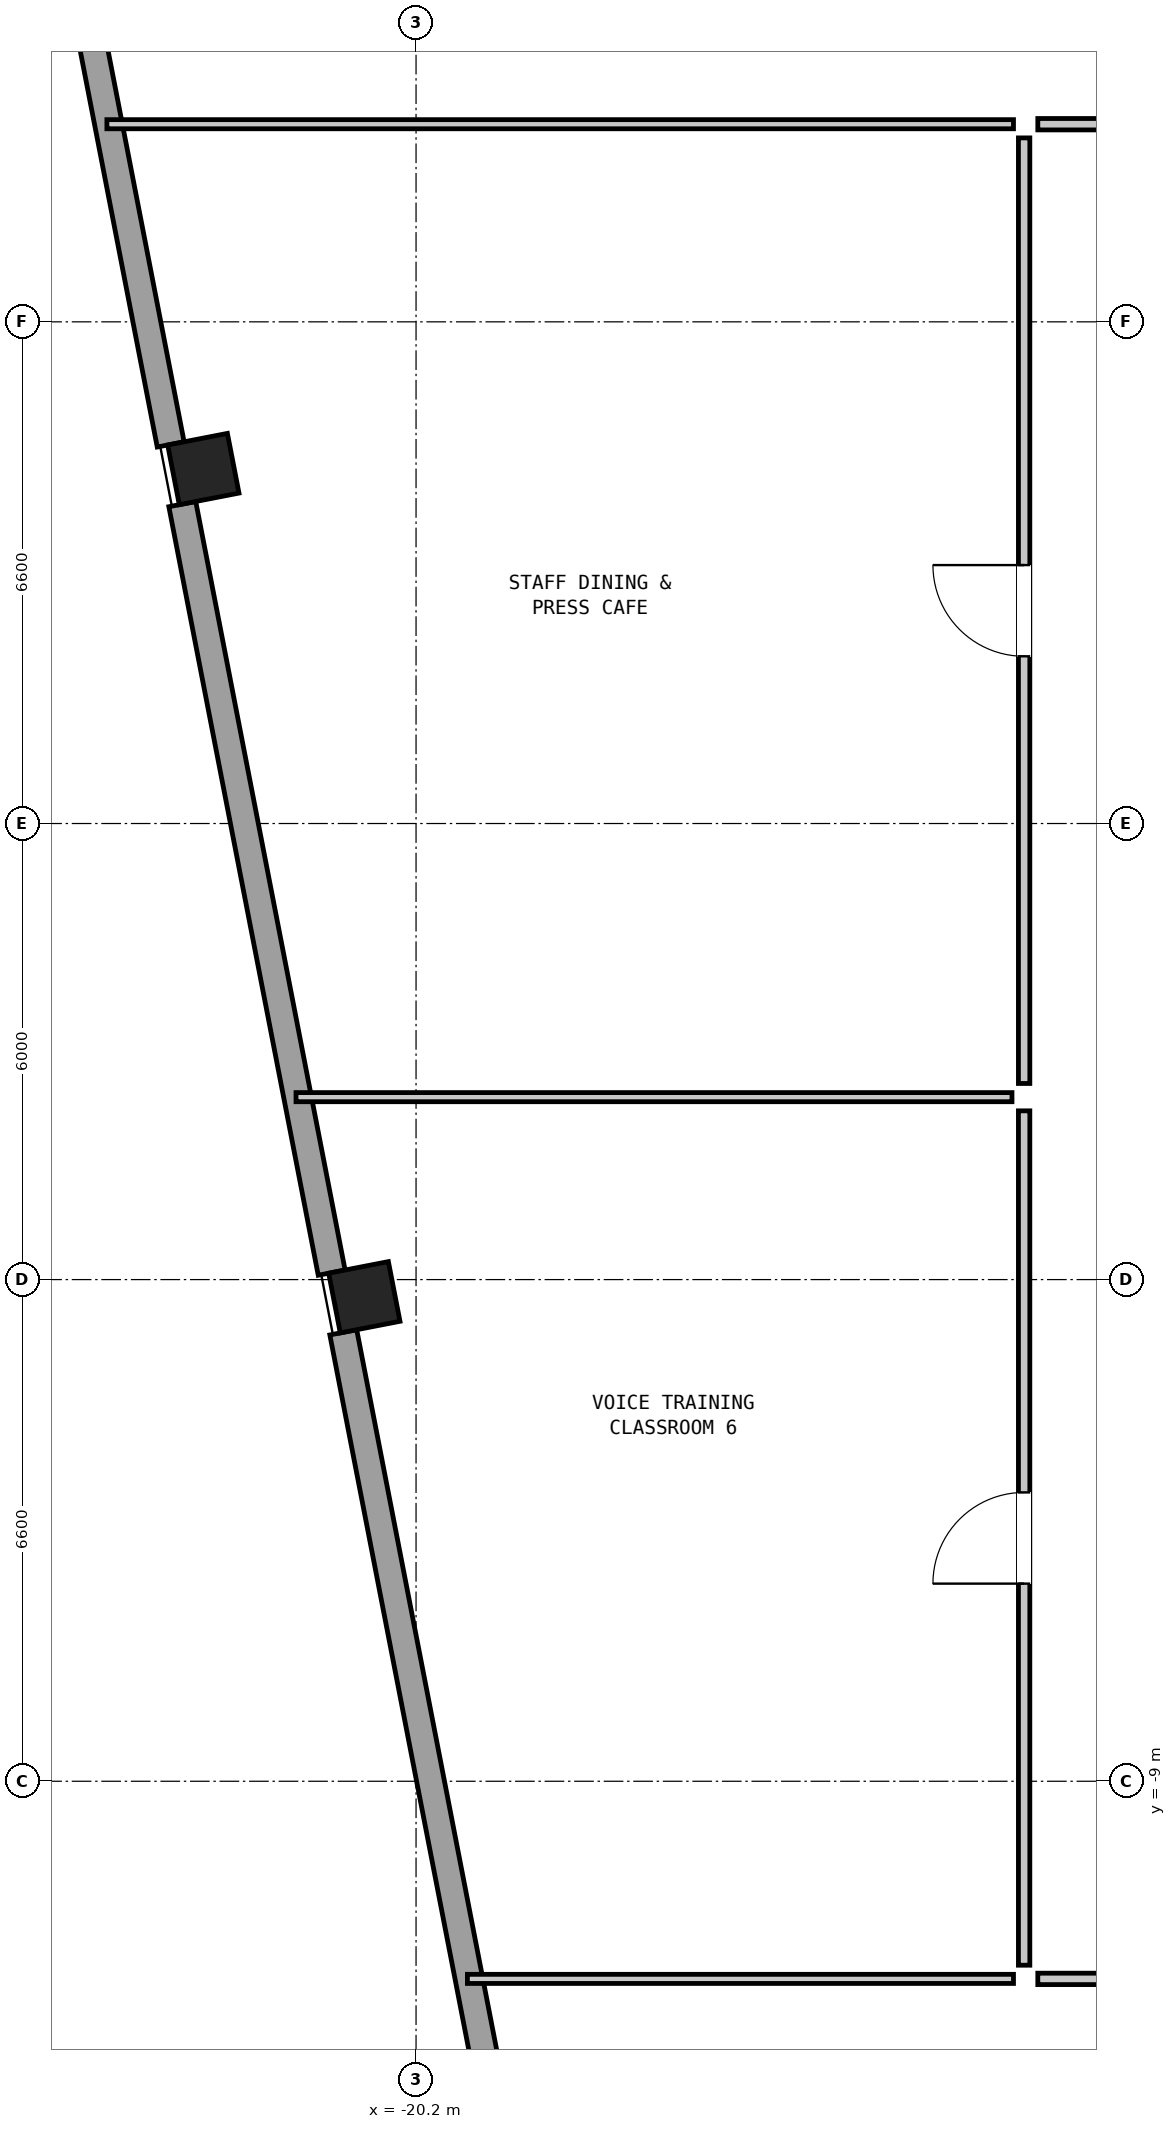
"""IFC4 building model, lengths in metres.
Left out: names, types, materials, properties, quantities, classifications, styles, units other than length and angle.
Written with IfcOpenShell. Run it as: python <this file> out.ifc"""

import sys

from ifc_helpers import new_model, si_unit, direction, frame, frame_2d, origin, origin_2d, place, context, subcontext, project, spatial, rectangle, hollow_rectangle, extrude, element, fill, save


model = new_model("IFC4")
c1 = context("Model", 3, precision=1e-05, world=origin(), true_north=direction((0.0, 1.0)))
c2 = subcontext(c1, "Body", "Model", "MODEL_VIEW")
j1 = project(units=[si_unit("LENGTHUNIT", "METRE"), si_unit("PLANEANGLEUNIT", "RADIAN")], contexts=[c1])
p1 = place(None, origin())
s1 = spatial("IfcSite", under=j1, at=p1, CompositionType="ELEMENT")
p2 = place(p1, origin())
s2 = spatial("IfcBuilding", under=s1, at=p2, CompositionType="ELEMENT")
p3 = place(p2, frame((0.0, 0.0, 137.2)))
s3 = spatial("IfcBuildingStorey", under=s2, at=p3, CompositionType="ELEMENT", Elevation=137.2)
for number, where, z_axis, x_axis in (
    (1, (-22.998, 8.263, 0.0), (0.0, 0.0, 1.0), (-0.191, 0.982, 0.0)),
    (2, (-20.88, -2.633, 0.0), (0.0, 0.0, 1.0), (-0.191, 0.982, 0.0)),
):
    element("IfcColumn", number, at=place(p3, frame(where, z_axis=z_axis, x_axis=x_axis)), inside=s3, PredefinedType="COLUMN", context=c2, shape_type="SweptSolid", body=[
        extrude(hollow_rectangle(XDim=0.8, YDim=0.8, WallThickness=0.05, at=origin_2d()), origin(), (0.0, 0.0, 1.0), 3.05),
    ])
p4 = place(p3, frame((-19.19, -13.217, 0.0), z_axis=(0.0, 0.0, 1.0), x_axis=(-0.190822765986, 0.981624506612, 0.0)))
e3 = element("IfcWall", 3, at=p4, inside=s3, PredefinedType="SOLIDWALL", context=c2, shape_type="SweptSolid", body=[
    extrude(rectangle(XDim=10.312, YDim=0.36, at=frame_2d((5.156, 0.0))), origin(), (0.0, 0.0, 1.0), 0.95),
])
p5 = place(p3, frame((-21.31, -2.309, 0.0), z_axis=(0.0, 0.0, 1.0), x_axis=(-0.190811924826, 0.981626614016, 0.0)))
e4 = element("IfcWall", 4, at=p5, inside=s3, PredefinedType="SOLIDWALL", context=c2, shape_type="SweptSolid", body=[
    extrude(rectangle(XDim=10.3, YDim=0.36, at=frame_2d((5.15, 0.0))), origin(), (0.0, 0.0, 1.0), 0.95),
])
p6 = place(p3, frame((-23.428, 8.587, 0.0), z_axis=(0.0, 0.0, 1.0), x_axis=(-0.190822765986, 0.981624506612, 0.0)))
e5 = element("IfcWall", 5, at=p6, inside=s3, PredefinedType="SOLIDWALL", context=c2, shape_type="SweptSolid", body=[
    extrude(rectangle(XDim=10.312, YDim=0.36, at=frame_2d((5.156, 0.0))), origin(), (0.0, 0.0, 1.0), 0.95),
])
p7 = place(p3, frame((-24.267, 12.8, 0.0), z_axis=(0.0, 0.0, 1.0), x_axis=(1.0, 0.0, 0.0)))
e6 = element("IfcWall", 6, at=p7, inside=s3, PredefinedType="PARTITIONING", context=c2, shape_type="SweptSolid", body=[
    extrude(rectangle(XDim=11.927, YDim=0.12, at=frame_2d((5.964, 0.0))), origin(), (0.0, 0.0, 1.0), 2.83),
])
p8 = place(p3, frame((-19.524, -11.6, 0.0), z_axis=(0.0, 0.0, 1.0), x_axis=(1.0, 0.0, 0.0)))
e7 = element("IfcWall", 7, at=p8, inside=s3, PredefinedType="PARTITIONING", context=c2, shape_type="SweptSolid", body=[
    extrude(rectangle(XDim=7.184, YDim=0.12, at=frame_2d((3.592, 0.0))), origin(), (0.0, 0.0, 1.0), 2.347),
])
p9 = place(p3, frame((-21.779, 0.0, 0.0), z_axis=(0.0, 0.0, 1.0), x_axis=(1.0, 0.0, 0.0)))
e8 = element("IfcWall", 8, at=p9, inside=s3, PredefinedType="PARTITIONING", context=c2, shape_type="SweptSolid", body=[
    extrude(rectangle(XDim=9.419, YDim=0.12, at=frame_2d((4.709, 0.0))), origin(), (0.0, 0.0, 1.0), 2.83),
])
p10 = place(p3, frame((-12.02, 12.8, 0.0), z_axis=(0.0, 0.0, 1.0), x_axis=(1.0, 0.0, 0.0)))
e9 = element("IfcWall", 9, at=p10, inside=s3, PredefinedType="PARTITIONING", context=c2, shape_type="SweptSolid", body=[
    extrude(rectangle(XDim=6.44, YDim=0.15, at=frame_2d((3.22, 0.0))), origin(), (0.0, 0.0, 1.0), 2.83),
])
p11 = place(p10, frame((3.02, 0.0, 0.0)))
e10 = element("IfcOpeningElement", 10, at=p11, cuts=e9, PredefinedType="OPENING", context=c2, shape_type="SweptSolid", body=[
    extrude(rectangle(XDim=1.2, YDim=2.1, at=frame_2d((0.6, 1.05))), frame((0.0, 0.087, 0.0), z_axis=(0.0, -1.0, 0.0), x_axis=(1.0, 0.0, 0.0)), (0.0, 0.0, 1.0), 0.174),
])
p12 = place(p3, frame((-12.02, -11.6, 0.0), z_axis=(0.0, 0.0, 1.0), x_axis=(1.0, 0.0, 0.0)))
e11 = element("IfcWall", 11, at=p12, inside=s3, PredefinedType="PARTITIONING", context=c2, shape_type="SweptSolid", body=[
    extrude(rectangle(XDim=11.84, YDim=0.15, at=frame_2d((5.92, 0.0))), origin(), (0.0, 0.0, 1.0), 2.347),
])
p13 = place(p12, frame((5.32, 0.0, 0.0)))
e12 = element("IfcOpeningElement", 12, at=p13, cuts=e11, PredefinedType="OPENING", context=c2, shape_type="SweptSolid", body=[
    extrude(rectangle(XDim=1.2, YDim=2.1, at=frame_2d((0.6, 1.05))), frame((0.0, 0.087, 0.0), z_axis=(0.0, -1.0, 0.0), x_axis=(1.0, 0.0, 0.0)), (0.0, 0.0, 1.0), 0.174),
])
p14 = place(p3, frame((-12.2, -11.42, 0.0), z_axis=(0.0, 0.0, 1.0), x_axis=(0.0, 1.0, 0.0)))
e13 = element("IfcWall", 13, at=p14, inside=s3, PredefinedType="PARTITIONING", context=c2, shape_type="SweptSolid", body=[
    extrude(rectangle(XDim=11.24, YDim=0.15, at=frame_2d((5.62, 0.0))), origin(), (0.0, 0.0, 1.0), 2.83),
])
p15 = place(p14, frame((5.02, 0.0, 0.0)))
e14 = element("IfcOpeningElement", 14, at=p15, cuts=e13, PredefinedType="OPENING", context=c2, shape_type="SweptSolid", body=[
    extrude(rectangle(XDim=1.2, YDim=2.1, at=frame_2d((0.6, 1.05))), frame((0.0, 0.087, 0.0), z_axis=(0.0, -1.0, 0.0), x_axis=(1.0, 0.0, 0.0)), (0.0, 0.0, 1.0), 0.174),
])
p16 = place(p3, frame((-12.2, 0.18, 0.0), z_axis=(0.0, 0.0, 1.0), x_axis=(0.0, 1.0, 0.0)))
e15 = element("IfcWall", 15, at=p16, inside=s3, PredefinedType="PARTITIONING", context=c2, shape_type="SweptSolid", body=[
    extrude(rectangle(XDim=12.44, YDim=0.15, at=frame_2d((6.22, 0.0))), origin(), (0.0, 0.0, 1.0), 2.83),
])
p17 = place(p16, frame((5.62, 0.0, 0.0)))
e16 = element("IfcOpeningElement", 16, at=p17, cuts=e15, PredefinedType="OPENING", context=c2, shape_type="SweptSolid", body=[
    extrude(rectangle(XDim=1.2, YDim=2.1, at=frame_2d((0.6, 1.05))), frame((0.0, 0.087, 0.0), z_axis=(0.0, -1.0, 0.0), x_axis=(1.0, 0.0, 0.0)), (0.0, 0.0, 1.0), 0.174),
])
p18 = place(p15, origin())
e17 = element("IfcDoor", 17, at=p18, inside=s3, OperationType="SINGLE_SWING_LEFT", PredefinedType="DOOR", context=c2, shape_type="SweptSolid", body=[
    extrude(rectangle(XDim=1.2, YDim=2.1, at=frame_2d((0.6, 1.05))), frame((0.0, 0.025, 0.0), z_axis=(0.0, -1.0, 0.0), x_axis=(1.0, 0.0, 0.0)), (0.0, 0.0, 1.0), 0.05),
])
fill(e14, e17)
p19 = place(p17, origin())
e18 = element("IfcDoor", 18, at=p19, inside=s3, OperationType="SINGLE_SWING_RIGHT", PredefinedType="DOOR", context=c2, shape_type="SweptSolid", body=[
    extrude(rectangle(XDim=1.2, YDim=2.1, at=frame_2d((0.6, 1.05))), frame((0.0, 0.025, 0.0), z_axis=(0.0, -1.0, 0.0), x_axis=(1.0, 0.0, 0.0)), (0.0, 0.0, 1.0), 0.05),
])
fill(e16, e18)
save(model, sys.argv[1])
